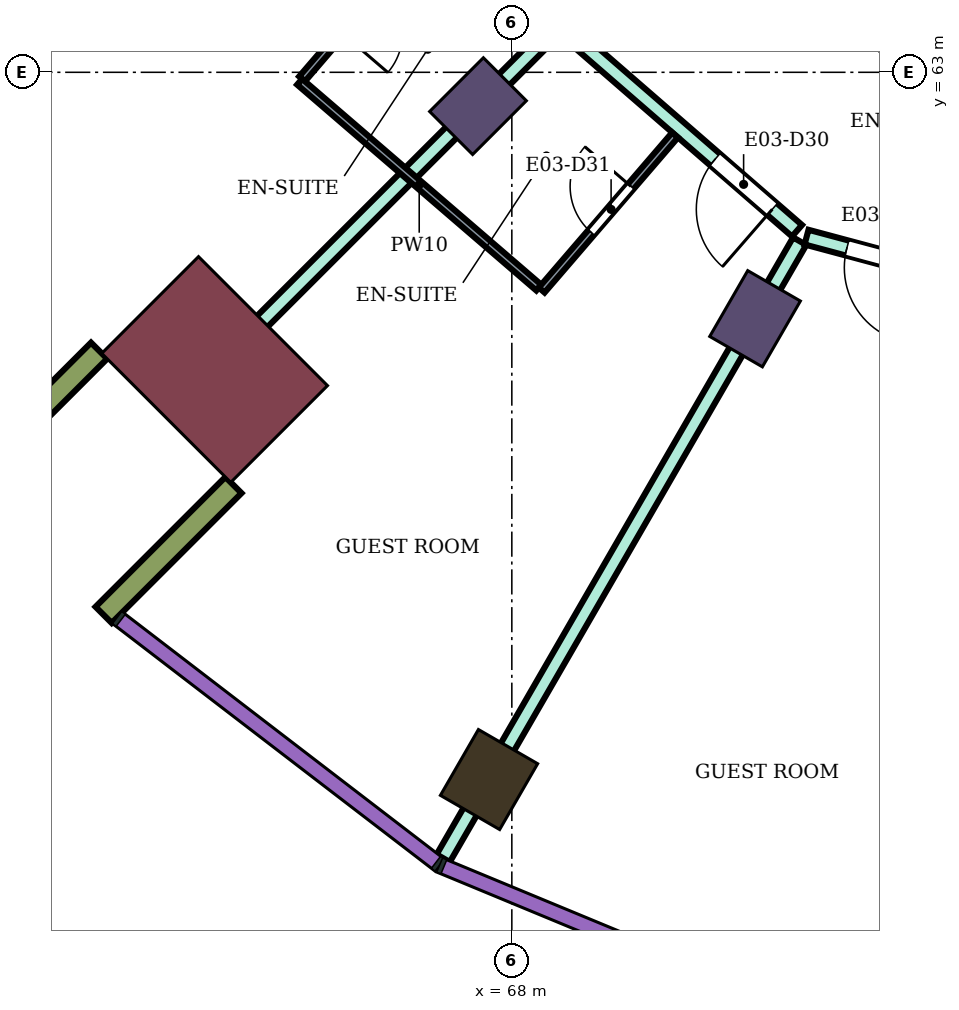
"""IFC4 building model, lengths in metres.
Left out: names, types, materials, properties, quantities, classifications, styles, units other than length and angle.
Written with IfcOpenShell. Run it as: python <this file> out.ifc"""

import sys

from ifc_helpers import new_model, si_unit, direction, frame, frame_2d, origin, origin_2d, place, context, subcontext, project, spatial, rectangle, extrude, element, fill, save


model = new_model("IFC4")
c1 = context("Model", 3, precision=1e-05, world=origin(), true_north=direction((0.0, 1.0)))
c2 = subcontext(c1, "Body", "Model", "MODEL_VIEW")
j1 = project(units=[si_unit("LENGTHUNIT", "METRE"), si_unit("PLANEANGLEUNIT", "RADIAN")], contexts=[c1])
p1 = place(None, origin())
s1 = spatial("IfcSite", under=j1, at=p1, CompositionType="ELEMENT")
p2 = place(p1, origin())
s2 = spatial("IfcBuilding", under=s1, at=p2, CompositionType="ELEMENT")
p3 = place(p2, frame((0.0, 0.0, 138.0)))
s3 = spatial("IfcBuildingStorey", under=s2, at=p3, CompositionType="ELEMENT", Elevation=138.0)
p4 = place(p3, frame((67.7, 53.696, 0.0), z_axis=(0.0, 0.0, 1.0), x_axis=(-0.5, -0.866025403784, 0.0)))
e1 = element("IfcColumn", 1, at=p4, inside=s3, PredefinedType="COLUMN", context=c2, shape_type="SweptSolid", body=[
    extrude(rectangle(XDim=1.0, YDim=0.9, at=origin_2d()), origin(), (0.0, 0.0, 1.0), 3.9),
])
for number, where, z_axis, x_axis in (
    (2, (67.555, 62.555, 0.0), (0.0, 0.0, 1.0), (-0.707, -0.707, 0.0)),
    (3, (71.2, 59.758, 0.0), (0.0, 0.0, 1.0), (-0.5, -0.866, 0.0)),
):
    element("IfcColumn", number, at=place(p3, frame(where, z_axis=z_axis, x_axis=x_axis)), inside=s3, PredefinedType="COLUMN", context=c2, shape_type="SweptSolid", body=[
        extrude(rectangle(XDim=1.0, YDim=0.8, at=origin_2d()), origin(), (0.0, 0.0, 1.0), 3.9),
    ])
p5 = place(p3, frame((64.09, 59.09, 0.0), z_axis=(0.0, 0.0, 1.0), x_axis=(-0.707106781187, -0.707106781187, 0.0)))
e4 = element("IfcColumn", 4, at=p5, inside=s3, PredefinedType="COLUMN", context=c2, shape_type="SweptSolid", body=[
    extrude(rectangle(XDim=1.8, YDim=2.4, at=origin_2d()), origin(), (0.0, 0.0, 1.0), 3.9),
])
for number, where, z_axis, x_axis in (
    (5, (62.57, 59.338, 0.0), (0.0, 0.0, 1.0), (-0.707, -0.707, 0.0)),
    (6, (64.338, 57.57, 0.0), (0.0, 0.0, 1.0), (-0.707, -0.707, 0.0)),
):
    element("IfcWall", number, at=place(p3, frame(where, z_axis=z_axis, x_axis=x_axis)), inside=s3, PredefinedType="NOTDEFINED", context=c2, shape_type="SweptSolid", body=[
        extrude(rectangle(XDim=2.416, YDim=0.3, at=frame_2d((1.208, 0.0))), origin(), (0.0, 0.0, 1.0), 3.9),
    ])
p6 = place(p3, frame((63.593, 58.599, 0.0), z_axis=(0.0, 0.0, 1.0), x_axis=(0.707228748718, 0.706984792613, 0.0)))
e7 = element("IfcWall", 7, at=p6, inside=s3, PredefinedType="PARTITIONING", context=c2, shape_type="SweptSolid", body=[
    extrude(rectangle(XDim=7.005, YDim=0.2, at=frame_2d((3.503, 0.0))), origin(), (0.0, 0.0, 1.0), 3.45),
])
p7 = place(p3, frame((67.082, 64.972, 0.0), z_axis=(0.0, 0.0, 1.0), x_axis=(0.755031061605, -0.65568902386, 0.0)))
e8 = element("IfcWall", 8, at=p7, inside=s3, PredefinedType="PARTITIONING", context=c2, shape_type="SweptSolid", body=[
    extrude(rectangle(XDim=6.186, YDim=0.2, at=frame_2d((3.093, 0.0))), origin(), (0.0, 0.0, 1.0), 3.45),
])
p8 = place(p7, frame((4.755, 0.0, 0.0)))
e9 = element("IfcOpeningElement", 9, at=p8, cuts=e8, PredefinedType="OPENING", context=c2, shape_type="SweptSolid", body=[
    extrude(rectangle(XDim=1.0, YDim=2.1, at=frame_2d((0.5, 1.05))), frame((0.0, 0.11, 0.0), z_axis=(0.0, -1.0, 0.0), x_axis=(1.0, 0.0, 0.0)), (0.0, 0.0, 1.0), 0.22),
])
p9 = place(p3, frame((67.097, 52.661, 0.0), z_axis=(0.0, 0.0, 1.0), x_axis=(0.500236379769, 0.865888886841, 0.0)))
e10 = element("IfcWall", 10, at=p9, inside=s3, PredefinedType="PARTITIONING", context=c2, shape_type="SweptSolid", body=[
    extrude(rectangle(XDim=9.375, YDim=0.2, at=frame_2d((4.688, 0.0))), origin(), (0.0, 0.0, 1.0), 3.45),
])
p10 = place(p3, frame((69.158, 66.6, 0.0), z_axis=(0.0, 0.0, 1.0), x_axis=(0.757976058094, -0.652282373943, 0.0)))
e11 = element("IfcWall", 11, at=p10, inside=s3, PredefinedType="PARTITIONING", context=c2, shape_type="SweptSolid", body=[
    extrude(rectangle(XDim=5.16, YDim=0.2, at=frame_2d((2.58, 0.0))), origin(), (0.0, 0.0, 1.0), 3.45),
])
p11 = place(p10, frame((1.6, 0.0, 0.0)))
e12 = element("IfcOpeningElement", 12, at=p11, cuts=e11, PredefinedType="OPENING", context=c2, shape_type="SweptSolid", body=[
    extrude(rectangle(XDim=1.0, YDim=2.1, at=frame_2d((0.5, 1.05))), frame((0.0, 0.11, 0.0), z_axis=(0.0, -1.0, 0.0), x_axis=(1.0, 0.0, 0.0)), (0.0, 0.0, 1.0), 0.22),
])
p12 = place(p3, frame((71.877, 60.832, 0.0), z_axis=(0.0, 0.0, 1.0), x_axis=(0.965852509869, -0.259092510851, 0.0)))
e13 = element("IfcWall", 13, at=p12, inside=s3, PredefinedType="PARTITIONING", context=c2, shape_type="SweptSolid", body=[
    extrude(rectangle(XDim=8.32, YDim=0.2, at=frame_2d((4.16, 0.0))), origin(), (0.0, 0.0, 1.0), 3.45),
])
p13 = place(p12, frame((6.86, 0.0, 0.0)))
e14 = element("IfcOpeningElement", 14, at=p13, cuts=e13, PredefinedType="OPENING", context=c2, shape_type="SweptSolid", body=[
    extrude(rectangle(XDim=1.0, YDim=2.1, at=frame_2d((0.5, 1.05))), frame((0.0, 0.11, 0.0), z_axis=(0.0, -1.0, 0.0), x_axis=(1.0, 0.0, 0.0)), (0.0, 0.0, 1.0), 0.22),
])
p14 = place(p12, frame((0.55, 0.0, 0.0)))
e15 = element("IfcOpeningElement", 15, at=p14, cuts=e13, PredefinedType="OPENING", context=c2, shape_type="SweptSolid", body=[
    extrude(rectangle(XDim=1.0, YDim=2.1, at=frame_2d((0.5, 1.05))), frame((0.0, 0.11, 0.0), z_axis=(0.0, -1.0, 0.0), x_axis=(1.0, 0.0, 0.0)), (0.0, 0.0, 1.0), 0.22),
])
p15 = place(p3, frame((65.24, 62.913, 0.0), z_axis=(0.0, 0.0, 1.0), x_axis=(0.652069888227, 0.758158862553, 0.0)))
e16 = element("IfcWall", 16, at=p15, inside=s3, PredefinedType="PARTITIONING", context=c2, shape_type="SweptSolid", body=[
    extrude(rectangle(XDim=2.75, YDim=0.1, at=frame_2d((1.375, 0.0))), origin(), (0.0, 0.0, 1.0), 3.45),
])
p16 = place(p15, frame((0.8, 0.0, 0.0)))
e17 = element("IfcOpeningElement", 17, at=p16, cuts=e16, PredefinedType="OPENING", context=c2, shape_type="SweptSolid", body=[
    extrude(rectangle(XDim=0.8, YDim=2.1, at=frame_2d((0.4, 1.05))), frame((0.0, 0.06, 0.0), z_axis=(0.0, -1.0, 0.0), x_axis=(1.0, 0.0, 0.0)), (0.0, 0.0, 1.0), 0.12),
])
p17 = place(p3, frame((65.208, 62.875, 0.0), z_axis=(0.0, 0.0, 1.0), x_axis=(0.757943251005, -0.652320495045, 0.0)))
e18 = element("IfcWall", 18, at=p17, inside=s3, PredefinedType="PARTITIONING", context=c2, shape_type="SweptSolid", body=[
    extrude(rectangle(XDim=4.151, YDim=0.1, at=frame_2d((2.076, 0.0))), origin(), (0.0, 0.0, 1.0), 3.45),
])
p18 = place(p3, frame((68.393, 60.135, 0.0), z_axis=(0.0, 0.0, 1.0), x_axis=(0.652061182569, 0.758166349944, 0.0)))
e19 = element("IfcWall", 19, at=p18, inside=s3, PredefinedType="PARTITIONING", context=c2, shape_type="SweptSolid", body=[
    extrude(rectangle(XDim=2.69, YDim=0.1, at=frame_2d((1.345, 0.0))), origin(), (0.0, 0.0, 1.0), 3.45),
])
p19 = place(p18, frame((1.0, 0.0, 0.0)))
e20 = element("IfcOpeningElement", 20, at=p19, cuts=e19, PredefinedType="OPENING", context=c2, shape_type="SweptSolid", body=[
    extrude(rectangle(XDim=0.8, YDim=2.1, at=frame_2d((0.4, 1.05))), frame((0.0, 0.06, 0.0), z_axis=(0.0, -1.0, 0.0), x_axis=(1.0, 0.0, 0.0)), (0.0, 0.0, 1.0), 0.12),
])
p20 = place(p14, frame((1.0, 0.0, 0.0), z_axis=(0.0, 0.0, 1.0), x_axis=(-1.0, 0.0, 0.0)))
e21 = element("IfcDoor", 21, at=p20, inside=s3, OperationType="SINGLE_SWING_LEFT", PredefinedType="DOOR", context=c2, shape_type="SweptSolid", body=[
    extrude(rectangle(XDim=1.0, YDim=2.1, at=frame_2d((0.5, 1.05))), frame((0.0, 0.025, 0.0), z_axis=(0.0, -1.0, 0.0), x_axis=(1.0, 0.0, 0.0)), (0.0, 0.0, 1.0), 0.05),
])
fill(e15, e21)
p21 = place(p8, frame((1.0, 0.0, 0.0), z_axis=(0.0, 0.0, 1.0), x_axis=(-1.0, 0.0, 0.0)))
e22 = element("IfcDoor", 22, at=p21, inside=s3, OperationType="SINGLE_SWING_LEFT", PredefinedType="DOOR", context=c2, shape_type="SweptSolid", body=[
    extrude(rectangle(XDim=1.0, YDim=2.1, at=frame_2d((0.5, 1.05))), frame((0.0, 0.025, 0.0), z_axis=(0.0, -1.0, 0.0), x_axis=(1.0, 0.0, 0.0)), (0.0, 0.0, 1.0), 0.05),
])
fill(e9, e22)
p22 = place(p19, origin())
e23 = element("IfcDoor", 23, at=p22, inside=s3, OperationType="SINGLE_SWING_RIGHT", PredefinedType="DOOR", context=c2, shape_type="SweptSolid", body=[
    extrude(rectangle(XDim=0.8, YDim=2.1, at=frame_2d((0.4, 1.05))), frame((0.0, 0.025, 0.0), z_axis=(0.0, -1.0, 0.0), x_axis=(1.0, 0.0, 0.0)), (0.0, 0.0, 1.0), 0.05),
])
fill(e20, e23)
save(model, sys.argv[1])
